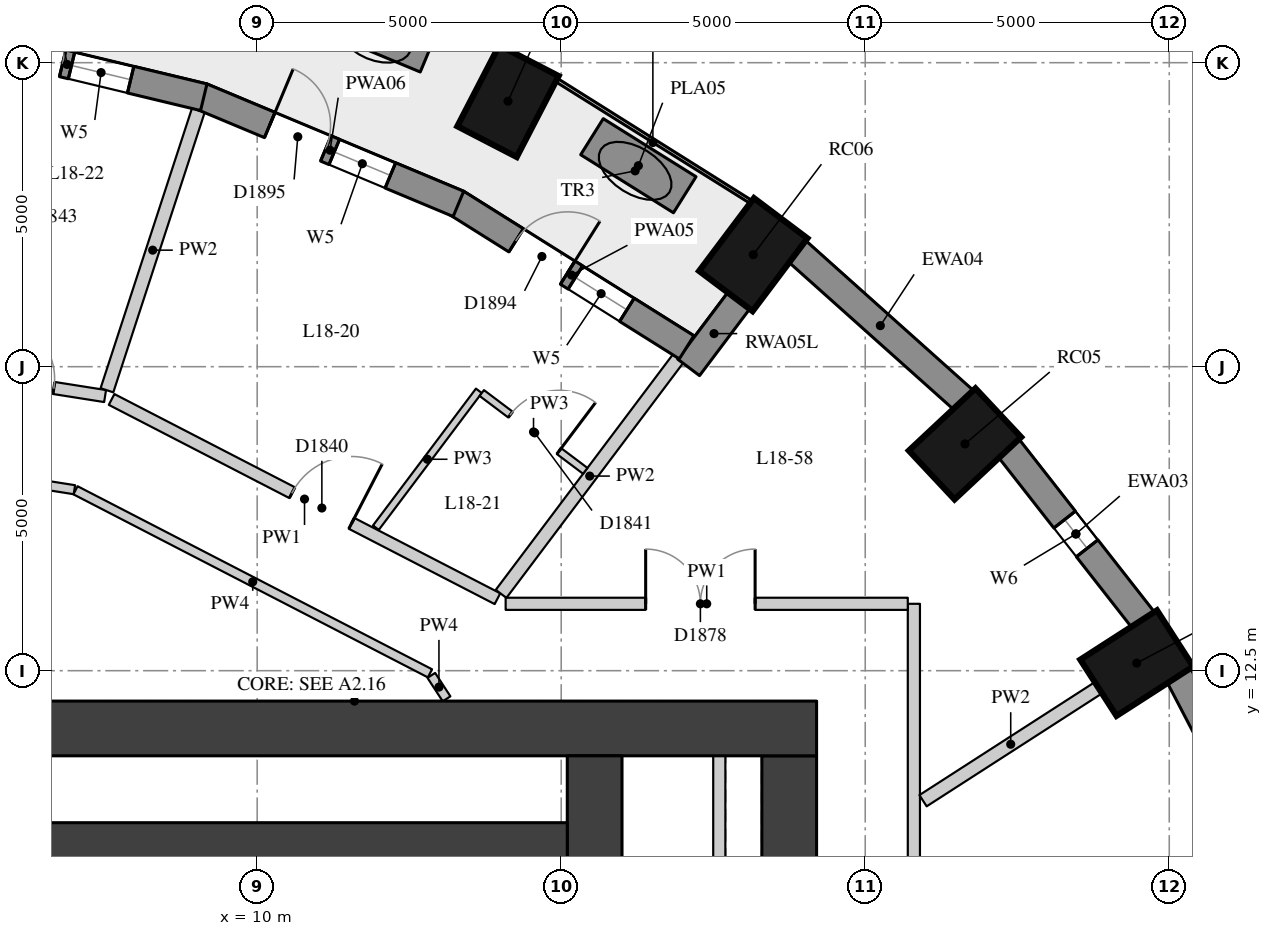
"""IFC4 building model, lengths in metres.
Left out: names, types, materials, properties, quantities, classifications, styles, units other than length and angle.
Written with IfcOpenShell. Run it as: python <this file> out.ifc"""

import sys

from ifc_helpers import new_model, si_unit, direction, frame, frame_2d, origin, origin_2d, place, context, subcontext, project, spatial, rectangle, extrude, element, fill, save


model = new_model("IFC4")
c1 = context("Model", 3, precision=1e-05, world=origin(), true_north=direction((0.0, 1.0)))
c2 = subcontext(c1, "Body", "Model", "MODEL_VIEW")
j1 = project(units=[si_unit("LENGTHUNIT", "METRE"), si_unit("PLANEANGLEUNIT", "RADIAN")], contexts=[c1])
p1 = place(None, origin())
s1 = spatial("IfcSite", under=j1, at=p1, CompositionType="ELEMENT")
p2 = place(p1, origin())
s2 = spatial("IfcBuilding", under=s1, at=p2, CompositionType="ELEMENT")
p3 = place(p2, frame((0.0, 0.0, 67.9)))
s3 = spatial("IfcBuildingStorey", under=s2, at=p3, CompositionType="ELEMENT", Elevation=67.9)
for number, where, z_axis, x_axis in (
    (1, (24.465, 12.625, 0.0), (0.0, 0.0, 1.0), (0.841, 0.541, 0.0)),
    (2, (21.641, 16.23, 0.0), (0.0, 0.0, 1.0), (0.73, 0.683, 0.0)),
    (3, (18.159, 19.343, 0.0), (0.0, 0.0, 1.0), (0.601, 0.799, 0.0)),
    (4, (14.125, 21.867, 0.0), (0.0, 0.0, 1.0), (0.46, 0.888, 0.0)),
):
    element("IfcColumn", number, at=place(p3, frame(where, z_axis=z_axis, x_axis=x_axis)), inside=s3, PredefinedType="COLUMN", context=c2, shape_type="SweptSolid", body=[
        extrude(rectangle(XDim=1.5, YDim=1.1, at=origin_2d()), origin(), (0.0, 0.0, 1.0), 3.3),
    ])
p4 = place(p3, frame((26.786, 9.305, 0.0), z_axis=(0.0, 0.0, 1.0), x_axis=(-0.462492775226, 0.886623050041, 0.0)))
e5 = element("IfcWall", 5, at=p4, inside=s3, PredefinedType="SOLIDWALL", context=c2, shape_type="SweptSolid", body=[
    extrude(rectangle(XDim=3.532, YDim=0.45, at=frame_2d((1.766, 0.0))), origin(), (0.0, 0.0, 1.0), 3.02),
])
p5 = place(p3, frame((24.578, 13.328, 0.0), z_axis=(0.0, 0.0, 1.0), x_axis=(-0.616661975264, 0.787228053529, 0.0)))
e6 = element("IfcWall", 6, at=p5, inside=s3, PredefinedType="SOLIDWALL", context=c2, shape_type="SweptSolid", body=[
    extrude(rectangle(XDim=3.61, YDim=0.45, at=frame_2d((1.805, 0.0))), origin(), (0.0, 0.0, 1.0), 3.02),
])
p6 = place(p5, frame((1.505, 0.0, 0.4)))
e7 = element("IfcOpeningElement", 7, at=p6, cuts=e6, PredefinedType="OPENING", context=c2, shape_type="SweptSolid", body=[
    extrude(rectangle(XDim=0.6, YDim=1.75, at=frame_2d((0.3, 0.875))), frame((0.0, 0.235, 0.0), z_axis=(0.0, -1.0, 0.0), x_axis=(1.0, 0.0, 0.0)), (0.0, 0.0, 1.0), 0.47),
])
p7 = place(p3, frame((21.627, 16.943, 0.0), z_axis=(0.0, 0.0, 1.0), x_axis=(-0.745526233716, 0.66647628228, 0.0)))
e8 = element("IfcWall", 8, at=p7, inside=s3, PredefinedType="SOLIDWALL", context=c2, shape_type="SweptSolid", body=[
    extrude(rectangle(XDim=3.697, YDim=0.45, at=frame_2d((1.848, 0.0))), origin(), (0.0, 0.0, 1.0), 3.02),
])
p8 = place(p3, frame((17.932, 18.6, 0.0), z_axis=(0.0, 0.0, 1.0), x_axis=(-0.601262851241, -0.799051302306, 0.0)))
e9 = element("IfcWall", 9, at=p8, inside=s3, PredefinedType="SOLIDWALL", context=c2, shape_type="SweptSolid", body=[
    extrude(rectangle(XDim=1.391, YDim=0.45, at=frame_2d((0.696, 0.0))), origin(), (0.0, 0.0, 1.0), 3.02),
])
p9 = place(p3, frame((17.062, 17.819, 0.0), z_axis=(0.0, 0.0, 1.0), x_axis=(-0.846990101364, 0.531608660757, 0.0)))
e10 = element("IfcWall", 10, at=p9, inside=s3, PredefinedType="SOLIDWALL", context=c2, shape_type="SweptSolid", body=[
    extrude(rectangle(XDim=4.469, YDim=0.45, at=frame_2d((2.234, 0.0))), origin(), (0.0, 0.0, 1.0), 3.02),
])
p10 = place(p9, frame((1.159, 0.0, 0.4)))
e11 = element("IfcOpeningElement", 11, at=p10, cuts=e10, PredefinedType="OPENING", context=c2, shape_type="SweptSolid", body=[
    extrude(rectangle(XDim=1.0, YDim=1.75, at=frame_2d((0.5, 0.875))), frame((0.0, 0.235, 0.0), z_axis=(0.0, -1.0, 0.0), x_axis=(1.0, 0.0, 0.0)), (0.0, 0.0, 1.0), 0.47),
])
p11 = place(p9, frame((2.31, 0.0, 0.0)))
e12 = element("IfcOpeningElement", 12, at=p11, cuts=e10, PredefinedType="OPENING", context=c2, shape_type="SweptSolid", body=[
    extrude(rectangle(XDim=1.0, YDim=2.15, at=frame_2d((0.5, 1.075))), frame((0.0, 0.235, 0.0), z_axis=(0.0, -1.0, 0.0), x_axis=(1.0, 0.0, 0.0)), (0.0, 0.0, 1.0), 0.47),
])
p12 = place(p3, frame((13.31, 20.178, 0.0), z_axis=(0.0, 0.0, 1.0), x_axis=(-0.922634412489, 0.385675693935, 0.0)))
e13 = element("IfcWall", 13, at=p12, inside=s3, PredefinedType="SOLIDWALL", context=c2, shape_type="SweptSolid", body=[
    extrude(rectangle(XDim=4.577, YDim=0.45, at=frame_2d((2.288, 0.0))), origin(), (0.0, 0.0, 1.0), 3.02),
])
p13 = place(p12, frame((1.213, 0.0, 0.4)))
e14 = element("IfcOpeningElement", 14, at=p13, cuts=e13, PredefinedType="OPENING", context=c2, shape_type="SweptSolid", body=[
    extrude(rectangle(XDim=1.0, YDim=1.75, at=frame_2d((0.5, 0.875))), frame((0.0, 0.235, 0.0), z_axis=(0.0, -1.0, 0.0), x_axis=(1.0, 0.0, 0.0)), (0.0, 0.0, 1.0), 0.47),
])
p14 = place(p12, frame((2.363, 0.0, 0.0)))
e15 = element("IfcOpeningElement", 15, at=p14, cuts=e13, PredefinedType="OPENING", context=c2, shape_type="SweptSolid", body=[
    extrude(rectangle(XDim=1.0, YDim=2.15, at=frame_2d((0.5, 1.075))), frame((0.0, 0.235, 0.0), z_axis=(0.0, -1.0, 0.0), x_axis=(1.0, 0.0, 0.0)), (0.0, 0.0, 1.0), 0.47),
])
p15 = place(p3, frame((9.122, 21.932, 0.0), z_axis=(0.0, 0.0, 1.0), x_axis=(-0.972346547441, 0.233542697764, 0.0)))
e16 = element("IfcWall", 16, at=p15, inside=s3, PredefinedType="SOLIDWALL", context=c2, shape_type="SweptSolid", body=[
    extrude(rectangle(XDim=4.624, YDim=0.45, at=frame_2d((2.312, 0.0))), origin(), (0.0, 0.0, 1.0), 3.02),
])
p16 = place(p15, frame((1.237, 0.0, 0.4)))
e17 = element("IfcOpeningElement", 17, at=p16, cuts=e16, PredefinedType="OPENING", context=c2, shape_type="SweptSolid", body=[
    extrude(rectangle(XDim=1.0, YDim=1.75, at=frame_2d((0.5, 0.875))), frame((0.0, 0.235, 0.0), z_axis=(0.0, -1.0, 0.0), x_axis=(1.0, 0.0, 0.0)), (0.0, 0.0, 1.0), 0.47),
])
p17 = place(p15, frame((2.387, 0.0, 0.0)))
e18 = element("IfcOpeningElement", 18, at=p17, cuts=e16, PredefinedType="OPENING", context=c2, shape_type="SweptSolid", body=[
    extrude(rectangle(XDim=1.0, YDim=2.15, at=frame_2d((0.5, 1.075))), frame((0.0, 0.235, 0.0), z_axis=(0.0, -1.0, 0.0), x_axis=(1.0, 0.0, 0.0)), (0.0, 0.0, 1.0), 0.47),
])
p18 = place(p3, frame((17.032, 20.328, 0.0), z_axis=(0.0, 0.0, 1.0), x_axis=(-0.847609446823, 0.530620604252, 0.0)))
e19 = element("IfcWall", 19, at=p18, inside=s3, PredefinedType="USERDEFINED", context=c2, shape_type="SweptSolid", body=[
    extrude(rectangle(XDim=1.8, YDim=0.7, at=frame_2d((0.9, 0.0))), origin(), (0.0, 0.0, 1.0), 0.75),
])
p19 = place(p3, frame((12.817, 22.67, 0.0), z_axis=(0.0, 0.0, 1.0), x_axis=(-0.923000660042, 0.384798364811, 0.0)))
e20 = element("IfcWall", 20, at=p19, inside=s3, PredefinedType="USERDEFINED", context=c2, shape_type="SweptSolid", body=[
    extrude(rectangle(XDim=1.8, YDim=0.7, at=frame_2d((0.9, 0.0))), origin(), (0.0, 0.0, 1.0), 0.75),
])
p20 = place(p3, frame((18.75, -11.1, 0.0), z_axis=(0.0, 0.0, 1.0), x_axis=(0.0, 1.0, 0.0)))
e21 = element("IfcWall", 21, at=p20, inside=s3, PredefinedType="SHEAR", context=c2, shape_type="SweptSolid", body=[
    extrude(rectangle(XDim=22.2, YDim=0.9, at=frame_2d((11.1, 0.0))), origin(), (0.0, 0.0, 1.0), 3.02),
])
p21 = place(p20, frame((15.675, 0.0, 0.0)))
e22 = element("IfcOpeningElement", 22, at=p21, cuts=e21, PredefinedType="OPENING", context=c2, shape_type="SweptSolid", body=[
    extrude(rectangle(XDim=1.5, YDim=2.1, at=frame_2d((0.75, 1.05))), frame((0.0, 0.46, 0.0), z_axis=(0.0, -1.0, 0.0), x_axis=(1.0, 0.0, 0.0)), (0.0, 0.0, 1.0), 0.92),
])
p22 = place(p20, frame((4.775, 0.0, 0.0)))
e23 = element("IfcOpeningElement", 23, at=p22, cuts=e21, PredefinedType="OPENING", context=c2, shape_type="SweptSolid", body=[
    extrude(rectangle(XDim=1.5, YDim=2.1, at=frame_2d((0.75, 1.05))), frame((0.0, 0.46, 0.0), z_axis=(0.0, -1.0, 0.0), x_axis=(1.0, 0.0, 0.0)), (0.0, 0.0, 1.0), 0.92),
])
p23 = place(p3, frame((4.0, 11.55, 0.0), z_axis=(0.0, 0.0, 1.0), x_axis=(1.0, 0.0, 0.0)))
e24 = element("IfcWall", 24, at=p23, inside=s3, PredefinedType="SHEAR", context=c2, shape_type="SweptSolid", body=[
    extrude(rectangle(XDim=15.2, YDim=0.9, at=frame_2d((7.6, 0.0))), origin(), (0.0, 0.0, 1.0), 3.02),
])
p24 = place(p3, frame((15.55, -11.1, 0.0), z_axis=(0.0, 0.0, 1.0), x_axis=(0.0, 1.0, 0.0)))
e25 = element("IfcWall", 25, at=p24, inside=s3, PredefinedType="SHEAR", context=c2, shape_type="SweptSolid", body=[
    extrude(rectangle(XDim=22.2, YDim=0.9, at=frame_2d((11.1, 0.0))), origin(), (0.0, 0.0, 1.0), 3.02),
])
p25 = place(p24, frame((15.6, 0.0, 0.0)))
e26 = element("IfcOpeningElement", 26, at=p25, cuts=e25, PredefinedType="OPENING", context=c2, shape_type="SweptSolid", body=[
    extrude(rectangle(XDim=1.0, YDim=2.1, at=frame_2d((0.5, 1.05))), frame((0.0, 0.46, 0.0), z_axis=(0.0, -1.0, 0.0), x_axis=(1.0, 0.0, 0.0)), (0.0, 0.0, 1.0), 0.92),
])
p26 = place(p24, frame((5.6, 0.0, 0.0)))
e27 = element("IfcOpeningElement", 27, at=p26, cuts=e25, PredefinedType="OPENING", context=c2, shape_type="SweptSolid", body=[
    extrude(rectangle(XDim=1.0, YDim=2.1, at=frame_2d((0.5, 1.05))), frame((0.0, 0.46, 0.0), z_axis=(0.0, -1.0, 0.0), x_axis=(1.0, 0.0, 0.0)), (0.0, 0.0, 1.0), 0.92),
])
p27 = place(p3, frame((4.9, 9.55, 0.0), z_axis=(0.0, 0.0, 1.0), x_axis=(1.0, 0.0, 0.0)))
e28 = element("IfcWall", 28, at=p27, inside=s3, PredefinedType="SHEAR", context=c2, shape_type="SweptSolid", body=[
    extrude(rectangle(XDim=10.2, YDim=0.9, at=frame_2d((5.1, 0.0))), origin(), (0.0, 0.0, 1.0), 3.02),
])
p28 = place(p3, frame((17.6, 6.4, 0.0), z_axis=(0.0, 0.0, 1.0), x_axis=(0.0, 1.0, 0.0)))
e29 = element("IfcWall", 29, at=p28, inside=s3, PredefinedType="PARTITIONING", context=c2, shape_type="SweptSolid", body=[
    extrude(rectangle(XDim=4.7, YDim=0.2, at=frame_2d((2.35, 0.0))), origin(), (0.0, 0.0, 1.0), 3.02),
])
p29 = place(p3, frame((20.8, 13.6, 0.0), z_axis=(0.0, 0.0, 1.0), x_axis=(0.0, -1.0, 0.0)))
e30 = element("IfcWall", 30, at=p29, inside=s3, PredefinedType="PARTITIONING", context=c2, shape_type="SweptSolid", body=[
    extrude(rectangle(XDim=10.428, YDim=0.2, at=frame_2d((5.214, 0.0))), origin(), (0.0, 0.0, 1.0), 3.02),
])
p30 = place(p29, frame((5.976, 0.0, 0.0)))
e31 = element("IfcOpeningElement", 31, at=p30, cuts=e30, PredefinedType="OPENING", context=c2, shape_type="SweptSolid", body=[
    extrude(rectangle(XDim=1.8, YDim=2.1, at=frame_2d((0.9, 1.05))), frame((0.0, 0.11, 0.0), z_axis=(0.0, -1.0, 0.0), x_axis=(1.0, 0.0, 0.0)), (0.0, 0.0, 1.0), 0.22),
])
p31 = place(p3, frame((0.119, 18.181, 0.0), z_axis=(0.0, 0.0, 1.0), x_axis=(0.987788122462, -0.155803161464, 0.0)))
e32 = element("IfcWall", 32, at=p31, inside=s3, PredefinedType="PARTITIONING", context=c2, shape_type="SweptSolid", body=[
    extrude(rectangle(XDim=7.471, YDim=0.2, at=frame_2d((3.736, 0.0))), origin(), (0.0, 0.0, 1.0), 3.02),
])
p32 = place(p31, frame((5.619, 0.0, 0.0)))
e33 = element("IfcOpeningElement", 33, at=p32, cuts=e32, PredefinedType="OPENING", context=c2, shape_type="SweptSolid", body=[
    extrude(rectangle(XDim=1.0, YDim=2.1, at=frame_2d((0.5, 1.05))), frame((0.0, 0.11, 0.0), z_axis=(0.0, -1.0, 0.0), x_axis=(1.0, 0.0, 0.0)), (0.0, 0.0, 1.0), 0.22),
])
p33 = place(p31, frame((0.732, 0.0, 0.0)))
e34 = element("IfcOpeningElement", 34, at=p33, cuts=e32, PredefinedType="OPENING", context=c2, shape_type="SweptSolid", body=[
    extrude(rectangle(XDim=1.0, YDim=2.1, at=frame_2d((0.5, 1.05))), frame((0.0, 0.11, 0.0), z_axis=(0.0, -1.0, 0.0), x_axis=(1.0, 0.0, 0.0)), (0.0, 0.0, 1.0), 0.22),
])
p34 = place(p3, frame((7.606, 16.961, 0.0), z_axis=(0.0, 0.0, 1.0), x_axis=(0.888519518851, -0.45883882205, 0.0)))
e35 = element("IfcWall", 35, at=p34, inside=s3, PredefinedType="PARTITIONING", context=c2, shape_type="SweptSolid", body=[
    extrude(rectangle(XDim=7.142, YDim=0.2, at=frame_2d((3.571, 0.0))), origin(), (0.0, 0.0, 1.0), 3.02),
])
p35 = place(p34, frame((3.342, 0.0, 0.0)))
e36 = element("IfcOpeningElement", 36, at=p35, cuts=e35, PredefinedType="OPENING", context=c2, shape_type="SweptSolid", body=[
    extrude(rectangle(XDim=1.1, YDim=2.1, at=frame_2d((0.55, 1.05))), frame((0.0, 0.11, 0.0), z_axis=(0.0, -1.0, 0.0), x_axis=(1.0, 0.0, 0.0)), (0.0, 0.0, 1.0), 0.22),
])
p36 = place(p3, frame((14.086, 13.6, 0.0), z_axis=(0.0, 0.0, 1.0), x_axis=(1.0, 0.0, 0.0)))
e37 = element("IfcWall", 37, at=p36, inside=s3, PredefinedType="PARTITIONING", context=c2, shape_type="SweptSolid", body=[
    extrude(rectangle(XDim=6.614, YDim=0.2, at=frame_2d((3.307, 0.0))), origin(), (0.0, 0.0, 1.0), 3.02),
])
p37 = place(p36, frame((2.303, 0.0, 0.0)))
e38 = element("IfcOpeningElement", 38, at=p37, cuts=e37, PredefinedType="OPENING", context=c2, shape_type="SweptSolid", body=[
    extrude(rectangle(XDim=1.8, YDim=2.1, at=frame_2d((0.9, 1.05))), frame((0.0, 0.11, 0.0), z_axis=(0.0, -1.0, 0.0), x_axis=(1.0, 0.0, 0.0)), (0.0, 0.0, 1.0), 0.22),
])
p38 = place(p3, frame((0.083, 16.567, 0.0), z_axis=(0.0, 0.0, 1.0), x_axis=(0.987781067139, -0.15584788546, 0.0)))
e39 = element("IfcWall", 39, at=p38, inside=s3, PredefinedType="PARTITIONING", context=c2, shape_type="SweptSolid", body=[
    extrude(rectangle(XDim=6.996, YDim=0.15, at=frame_2d((3.498, 0.0))), origin(), (0.0, 0.0, 1.0), 3.02),
])
p39 = place(p3, frame((7.012, 15.467, 0.0), z_axis=(0.0, 0.0, 1.0), x_axis=(0.888509096081, -0.458859004685, 0.0)))
e40 = element("IfcWall", 40, at=p39, inside=s3, PredefinedType="PARTITIONING", context=c2, shape_type="SweptSolid", body=[
    extrude(rectangle(XDim=6.561, YDim=0.15, at=frame_2d((3.281, 0.0))), origin(), (0.0, 0.0, 1.0), 3.02),
])
p40 = place(p3, frame((12.864, 12.423, 0.0), z_axis=(0.0, 0.0, 1.0), x_axis=(0.545733799108, -0.837958603101, 0.0)))
e41 = element("IfcWall", 41, at=p40, inside=s3, PredefinedType="PARTITIONING", context=c2, shape_type="SweptSolid", body=[
    extrude(rectangle(XDim=0.46, YDim=0.15, at=frame_2d((0.23, 0.0))), origin(), (0.0, 0.0, 1.0), 3.02),
])
p41 = place(p3, frame((23.835, 12.219, 0.0), z_axis=(0.0, 0.0, 1.0), x_axis=(-0.840694872373, -0.541509124176, 0.0)))
e42 = element("IfcWall", 42, at=p41, inside=s3, PredefinedType="PARTITIONING", context=c2, shape_type="SweptSolid", body=[
    extrude(rectangle(XDim=3.43, YDim=0.22, at=frame_2d((1.715, 0.0))), origin(), (0.0, 0.0, 1.0), 3.02),
])
p42 = place(p3, frame((16.927, 17.638, 0.0), z_axis=(0.0, 0.0, 1.0), x_axis=(-0.601159395391, -0.799129139334, 0.0)))
e43 = element("IfcWall", 43, at=p42, inside=s3, PredefinedType="PARTITIONING", context=c2, shape_type="SweptSolid", body=[
    extrude(rectangle(XDim=4.849, YDim=0.22, at=frame_2d((2.425, 0.0))), origin(), (0.0, 0.0, 1.0), 3.02),
])
p43 = place(p3, frame((9.034, 21.721, 0.0), z_axis=(0.0, 0.0, 1.0), x_axis=(-0.310330277344, -0.95062880188, 0.0)))
e44 = element("IfcWall", 44, at=p43, inside=s3, PredefinedType="PARTITIONING", context=c2, shape_type="SweptSolid", body=[
    extrude(rectangle(XDim=4.848, YDim=0.22, at=frame_2d((2.424, 0.0))), origin(), (0.0, 0.0, 1.0), 3.02),
])
p44 = place(p3, frame((11.952, 14.852, 0.0), z_axis=(0.0, 0.0, 1.0), x_axis=(0.60115003842, 0.7991361782, 0.0)))
e45 = element("IfcWall", 45, at=p44, inside=s3, PredefinedType="PARTITIONING", context=c2, shape_type="SweptSolid", body=[
    extrude(rectangle(XDim=2.818, YDim=0.12, at=frame_2d((1.409, 0.0))), origin(), (0.0, 0.0, 1.0), 3.02),
])
p45 = place(p3, frame((13.694, 17.067, 0.0), z_axis=(0.0, 0.0, 1.0), x_axis=(0.799118870394, -0.601173045786, 0.0)))
e46 = element("IfcWall", 46, at=p45, inside=s3, PredefinedType="PARTITIONING", context=c2, shape_type="SweptSolid", body=[
    extrude(rectangle(XDim=2.13, YDim=0.12, at=frame_2d((1.065, 0.0))), origin(), (0.0, 0.0, 1.0), 3.02),
])
p46 = place(p45, frame((0.59, 0.0, 0.0)))
e47 = element("IfcOpeningElement", 47, at=p46, cuts=e46, PredefinedType="OPENING", context=c2, shape_type="SweptSolid", body=[
    extrude(rectangle(XDim=1.0, YDim=2.1, at=frame_2d((0.5, 1.05))), frame((0.0, 0.07, 0.0), z_axis=(0.0, -1.0, 0.0), x_axis=(1.0, 0.0, 0.0)), (0.0, 0.0, 1.0), 0.14),
])
p47 = place(p6, origin())
e48 = element("IfcWindow", 48, at=p47, inside=s3, PartitioningType="SINGLE_PANEL", PredefinedType="WINDOW", context=c2, shape_type="SweptSolid", body=[
    extrude(rectangle(XDim=0.6, YDim=1.75, at=frame_2d((0.3, 0.875))), frame((0.0, 0.035, 0.0), z_axis=(0.0, -1.0, 0.0), x_axis=(1.0, 0.0, 0.0)), (0.0, 0.0, 1.0), 0.06),
])
fill(e7, e48)
p48 = place(p10, origin())
e49 = element("IfcWindow", 49, at=p48, inside=s3, PartitioningType="SINGLE_PANEL", PredefinedType="WINDOW", context=c2, shape_type="SweptSolid", body=[
    extrude(rectangle(XDim=1.0, YDim=1.75, at=frame_2d((0.5, 0.875))), frame((0.0, 0.035, 0.0), z_axis=(0.0, -1.0, 0.0), x_axis=(1.0, 0.0, 0.0)), (0.0, 0.0, 1.0), 0.06),
])
fill(e11, e49)
p49 = place(p11, frame((1.0, 0.0, 0.0), z_axis=(0.0, 0.0, 1.0), x_axis=(-1.0, 0.0, 0.0)))
e50 = element("IfcDoor", 50, at=p49, inside=s3, OperationType="SINGLE_SWING_RIGHT", PredefinedType="DOOR", context=c2, shape_type="SweptSolid", body=[
    extrude(rectangle(XDim=1.0, YDim=2.15, at=frame_2d((0.5, 1.075))), frame((0.0, 0.075, 0.0), z_axis=(0.0, -1.0, 0.0), x_axis=(1.0, 0.0, 0.0)), (0.0, 0.0, 1.0), 0.05),
])
fill(e12, e50)
p50 = place(p13, origin())
e51 = element("IfcWindow", 51, at=p50, inside=s3, PartitioningType="SINGLE_PANEL", PredefinedType="WINDOW", context=c2, shape_type="SweptSolid", body=[
    extrude(rectangle(XDim=1.0, YDim=1.75, at=frame_2d((0.5, 0.875))), frame((0.0, 0.035, 0.0), z_axis=(0.0, -1.0, 0.0), x_axis=(1.0, 0.0, 0.0)), (0.0, 0.0, 1.0), 0.06),
])
fill(e14, e51)
p51 = place(p14, frame((1.0, 0.0, 0.0), z_axis=(0.0, 0.0, 1.0), x_axis=(-1.0, 0.0, 0.0)))
e52 = element("IfcDoor", 52, at=p51, inside=s3, OperationType="SINGLE_SWING_LEFT", PredefinedType="DOOR", context=c2, shape_type="SweptSolid", body=[
    extrude(rectangle(XDim=1.0, YDim=2.15, at=frame_2d((0.5, 1.075))), frame((0.0, 0.075, 0.0), z_axis=(0.0, -1.0, 0.0), x_axis=(1.0, 0.0, 0.0)), (0.0, 0.0, 1.0), 0.05),
])
fill(e15, e52)
p52 = place(p16, origin())
e53 = element("IfcWindow", 53, at=p52, inside=s3, PartitioningType="SINGLE_PANEL", PredefinedType="WINDOW", context=c2, shape_type="SweptSolid", body=[
    extrude(rectangle(XDim=1.0, YDim=1.75, at=frame_2d((0.5, 0.875))), frame((0.0, 0.035, 0.0), z_axis=(0.0, -1.0, 0.0), x_axis=(1.0, 0.0, 0.0)), (0.0, 0.0, 1.0), 0.06),
])
fill(e17, e53)
p53 = place(p17, frame((1.0, 0.0, 0.0), z_axis=(0.0, 0.0, 1.0), x_axis=(-1.0, 0.0, 0.0)))
e54 = element("IfcDoor", 54, at=p53, inside=s3, OperationType="SINGLE_SWING_LEFT", PredefinedType="DOOR", context=c2, shape_type="SweptSolid", body=[
    extrude(rectangle(XDim=1.0, YDim=2.15, at=frame_2d((0.5, 1.075))), frame((0.0, 0.075, 0.0), z_axis=(0.0, -1.0, 0.0), x_axis=(1.0, 0.0, 0.0)), (0.0, 0.0, 1.0), 0.05),
])
fill(e18, e54)
p54 = place(p35, origin())
e55 = element("IfcDoor", 55, at=p54, inside=s3, OperationType="SINGLE_SWING_RIGHT", PredefinedType="DOOR", context=c2, shape_type="SweptSolid", body=[
    extrude(rectangle(XDim=1.1, YDim=2.1, at=frame_2d((0.55, 1.05))), frame((0.0, 0.025, 0.0), z_axis=(0.0, -1.0, 0.0), x_axis=(1.0, 0.0, 0.0)), (0.0, 0.0, 1.0), 0.05),
])
fill(e36, e55)
p55 = place(p46, origin())
e56 = element("IfcDoor", 56, at=p55, inside=s3, OperationType="SINGLE_SWING_RIGHT", PredefinedType="DOOR", context=c2, shape_type="SweptSolid", body=[
    extrude(rectangle(XDim=1.0, YDim=2.1, at=frame_2d((0.5, 1.05))), frame((0.0, 0.025, 0.0), z_axis=(0.0, -1.0, 0.0), x_axis=(1.0, 0.0, 0.0)), (0.0, 0.0, 1.0), 0.05),
])
fill(e47, e56)
p56 = place(p32, origin())
e57 = element("IfcDoor", 57, at=p56, inside=s3, OperationType="SINGLE_SWING_LEFT", PredefinedType="DOOR", context=c2, shape_type="SweptSolid", body=[
    extrude(rectangle(XDim=1.0, YDim=2.1, at=frame_2d((0.5, 1.05))), frame((0.0, 0.025, 0.0), z_axis=(0.0, -1.0, 0.0), x_axis=(1.0, 0.0, 0.0)), (0.0, 0.0, 1.0), 0.05),
])
fill(e33, e57)
p57 = place(p37, origin())
e58 = element("IfcDoor", 58, at=p57, inside=s3, OperationType="DOUBLE_DOOR_SINGLE_SWING", PredefinedType="DOOR", context=c2, shape_type="SweptSolid", body=[
    extrude(rectangle(XDim=1.8, YDim=2.1, at=frame_2d((0.9, 1.05))), frame((0.0, 0.025, 0.0), z_axis=(0.0, -1.0, 0.0), x_axis=(1.0, 0.0, 0.0)), (0.0, 0.0, 1.0), 0.05),
])
fill(e38, e58)
save(model, sys.argv[1])
